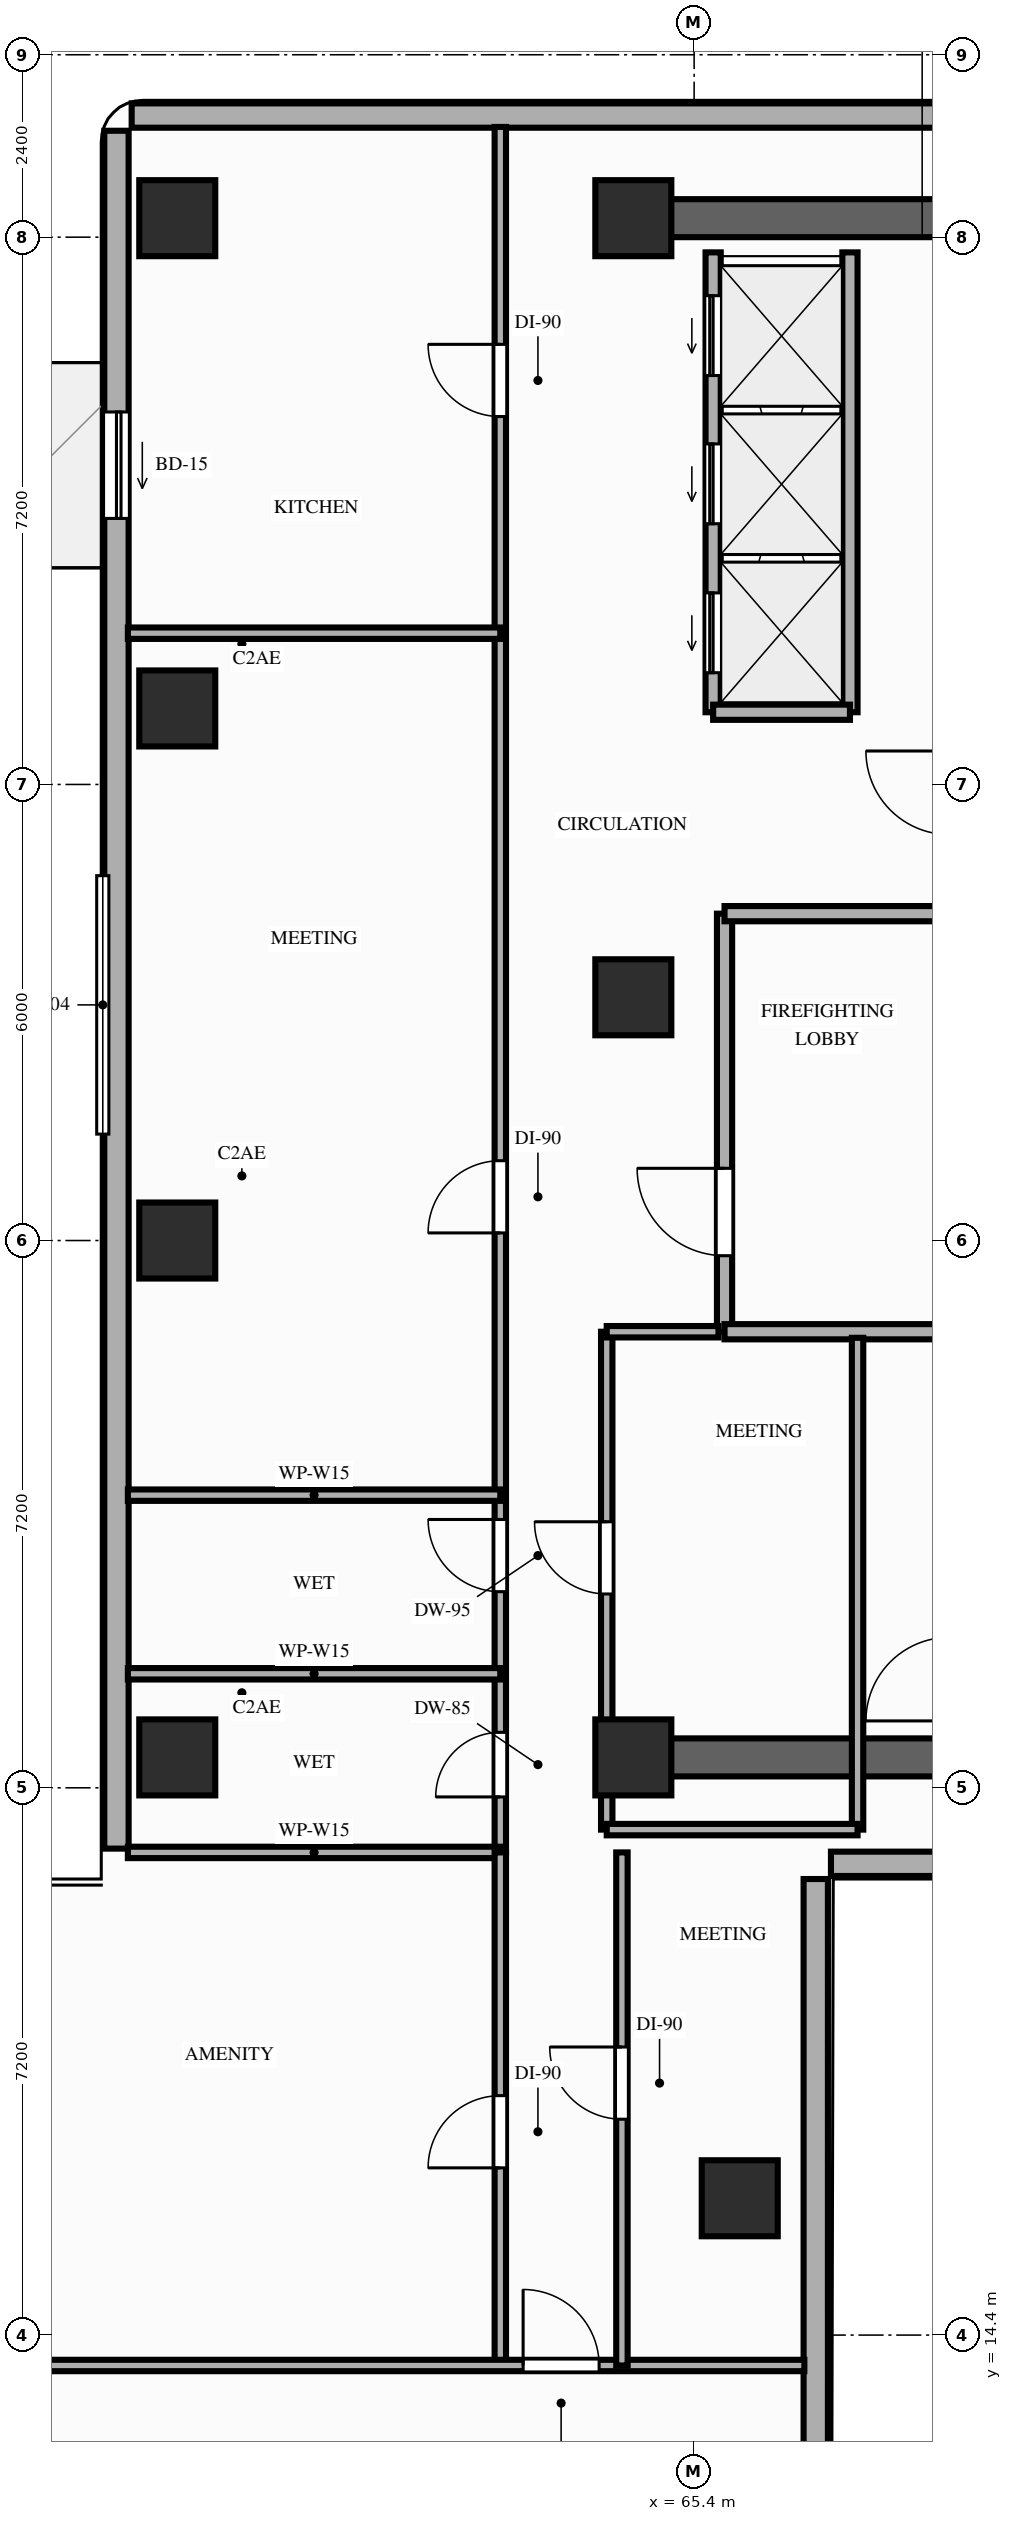
"""IFC4 building model, lengths in metres.
Left out: names, types, materials, properties, quantities, classifications, styles, units other than length and angle.
Written with IfcOpenShell. Run it as: python <this file> out.ifc"""

import sys

from ifc_helpers import new_model, si_unit, direction, frame, frame_2d, origin, origin_2d, place, context, subcontext, project, spatial, rectangle, extrude, element, fill, save


model = new_model("IFC4")
c1 = context("Model", 3, precision=1e-05, world=origin(), true_north=direction((0.0, 1.0)))
c2 = subcontext(c1, "Body", "Model", "MODEL_VIEW")
j1 = project(units=[si_unit("LENGTHUNIT", "METRE"), si_unit("PLANEANGLEUNIT", "RADIAN")], contexts=[c1])
p1 = place(None, origin())
s1 = spatial("IfcSite", under=j1, at=p1, CompositionType="ELEMENT")
p2 = place(p1, origin())
s2 = spatial("IfcBuilding", under=s1, at=p2, CompositionType="ELEMENT")
p3 = place(p2, frame((0.0, 0.0, 50.0)))
s3 = spatial("IfcBuildingStorey", under=s2, at=p3, CompositionType="ELEMENT", Elevation=50.0)
for number, where, z_axis, x_axis in (
    (1, (64.6, 22.0, 0.0), (0.0, 0.0, 1.0), (1.0, 0.0, 0.0)),
    (2, (64.6, 32.0, 0.0), (0.0, 0.0, 1.0), (1.0, 0.0, 0.0)),
    (3, (64.6, 42.25, 0.0), (0.0, 0.0, 1.0), (1.0, 0.0, 0.0)),
    (4, (58.6, 22.0, 0.0), (0.0, 0.0, 1.0), (1.0, 0.0, 0.0)),
    (5, (58.6, 28.8, 0.0), (0.0, 0.0, 1.0), (1.0, 0.0, 0.0)),
    (6, (58.6, 35.8, 0.0), (0.0, 0.0, 1.0), (1.0, 0.0, 0.0)),
    (7, (58.6, 42.25, 0.0), (0.0, 0.0, 1.0), (1.0, 0.0, 0.0)),
    (8, (66.0, 16.2, 0.0), (0.0, 0.0, 1.0), (1.0, 0.0, 0.0)),
):
    element("IfcColumn", number, at=place(p3, frame(where, z_axis=z_axis, x_axis=x_axis)), inside=s3, PredefinedType="COLUMN", context=c2, shape_type="SweptSolid", body=[
        extrude(rectangle(XDim=1.0, YDim=1.0, at=origin_2d()), origin(), (0.0, 0.0, 1.0), 3.2),
    ])
p4 = place(p3, frame((57.8, 43.4, 0.0), z_axis=(0.0, 0.0, 1.0), x_axis=(0.0, -1.0, 0.0)))
e9 = element("IfcWall", 9, at=p4, inside=s3, PredefinedType="STANDARD", context=c2, shape_type="SweptSolid", body=[
    extrude(rectangle(XDim=22.6, YDim=0.32, at=frame_2d((11.3, 0.0))), origin(), (0.0, 0.0, 1.0), 2.51),
])
p5 = place(p4, frame((3.7, 0.0, 0.0)))
e10 = element("IfcOpeningElement", 10, at=p5, cuts=e9, PredefinedType="OPENING", context=c2, shape_type="SweptSolid", body=[
    extrude(rectangle(XDim=1.4, YDim=2.1, at=frame_2d((0.7, 1.05))), frame((0.0, 0.17, 0.0), z_axis=(0.0, -1.0, 0.0), x_axis=(1.0, 0.0, 0.0)), (0.0, 0.0, 1.0), 0.34),
])
p6 = place(p3, frame((72.8, 43.6, 0.0), z_axis=(0.0, 0.0, 1.0), x_axis=(-1.0, 0.0, 0.0)))
e11 = element("IfcWall", 11, at=p6, inside=s3, PredefinedType="STANDARD", context=c2, shape_type="SweptSolid", body=[
    extrude(rectangle(XDim=14.8, YDim=0.32, at=frame_2d((7.4, 0.0))), origin(), (0.0, 0.0, 1.0), 3.02),
])
p7 = place(p3, frame((67.0, 7.6, 0.0), z_axis=(0.0, 0.0, 1.0), x_axis=(0.0, 1.0, 0.0)))
e12 = element("IfcWall", 12, at=p7, inside=s3, PredefinedType="STANDARD", context=c2, shape_type="SweptSolid", body=[
    extrude(rectangle(XDim=12.8, YDim=0.32, at=frame_2d((6.4, 0.0))), origin(), (0.0, 0.0, 1.0), 3.02),
])
p8 = place(p3, frame((67.2, 20.6, 0.0), z_axis=(0.0, 0.0, 1.0), x_axis=(1.0, 0.0, 0.0)))
e13 = element("IfcWall", 13, at=p8, inside=s3, PredefinedType="STANDARD", context=c2, shape_type="SweptSolid", body=[
    extrude(rectangle(XDim=5.6, YDim=0.32, at=frame_2d((2.8, 0.0))), origin(), (0.0, 0.0, 1.0), 3.02),
])
for number, where, z_axis, x_axis in (
    (14, (64.6, 42.25, 0.0), (0.0, 0.0, 1.0), (1.0, 0.0, 0.0)),
    (15, (64.6, 22.0, 0.0), (0.0, 0.0, 1.0), (1.0, 0.0, 0.0)),
):
    element("IfcWall", number, at=place(p3, frame(where, z_axis=z_axis, x_axis=x_axis)), inside=s3, PredefinedType="SHEAR", context=c2, shape_type="SweptSolid", body=[
        extrude(rectangle(XDim=7.5, YDim=0.5, at=frame_2d((3.75, 0.0))), origin(), (0.0, 0.0, 1.0), 3.02),
    ])
p9 = place(p3, frame((65.65, 35.75, 0.0), z_axis=(0.0, 0.0, 1.0), x_axis=(0.0, 1.0, 0.0)))
e16 = element("IfcWall", 16, at=p9, inside=s3, PredefinedType="MOVABLE", context=c2, shape_type="SweptSolid", body=[
    extrude(rectangle(XDim=6.05, YDim=0.2, at=frame_2d((3.025, 0.0))), origin(), (0.0, 0.0, 1.0), 3.02),
])
p10 = place(p9, frame((0.52, 0.0, 0.0)))
e17 = element("IfcOpeningElement", 17, at=p10, cuts=e16, PredefinedType="OPENING", context=c2, shape_type="SweptSolid", body=[
    extrude(rectangle(XDim=1.05, YDim=2.15, at=frame_2d((0.525, 1.075))), frame((0.0, 0.11, 0.0), z_axis=(0.0, -1.0, 0.0), x_axis=(1.0, 0.0, 0.0)), (0.0, 0.0, 1.0), 0.22),
])
p11 = place(p9, frame((2.48, 0.0, 0.0)))
e18 = element("IfcOpeningElement", 18, at=p11, cuts=e16, PredefinedType="OPENING", context=c2, shape_type="SweptSolid", body=[
    extrude(rectangle(XDim=1.05, YDim=2.15, at=frame_2d((0.525, 1.075))), frame((0.0, 0.11, 0.0), z_axis=(0.0, -1.0, 0.0), x_axis=(1.0, 0.0, 0.0)), (0.0, 0.0, 1.0), 0.22),
])
p12 = place(p9, frame((4.43, 0.0, 0.0)))
e19 = element("IfcOpeningElement", 19, at=p12, cuts=e16, PredefinedType="OPENING", context=c2, shape_type="SweptSolid", body=[
    extrude(rectangle(XDim=1.05, YDim=2.15, at=frame_2d((0.525, 1.075))), frame((0.0, 0.11, 0.0), z_axis=(0.0, -1.0, 0.0), x_axis=(1.0, 0.0, 0.0)), (0.0, 0.0, 1.0), 0.22),
])
p13 = place(p3, frame((67.45, 35.75, 0.0), z_axis=(0.0, 0.0, 1.0), x_axis=(0.0, 1.0, 0.0)))
e20 = element("IfcWall", 20, at=p13, inside=s3, PredefinedType="MOVABLE", context=c2, shape_type="SweptSolid", body=[
    extrude(rectangle(XDim=6.05, YDim=0.2, at=frame_2d((3.025, 0.0))), origin(), (0.0, 0.0, 1.0), 3.02),
])
p14 = place(p3, frame((65.65, 35.75, 0.0), z_axis=(0.0, 0.0, 1.0), x_axis=(1.0, 0.0, 0.0)))
e21 = element("IfcWall", 21, at=p14, inside=s3, PredefinedType="MOVABLE", context=c2, shape_type="SweptSolid", body=[
    extrude(rectangle(XDim=1.8, YDim=0.2, at=frame_2d((0.9, 0.0))), origin(), (0.0, 0.0, 1.0), 3.02),
])
p15 = place(p3, frame((65.8, 27.6, 0.0), z_axis=(0.0, 0.0, 1.0), x_axis=(0.0, 1.0, 0.0)))
e22 = element("IfcWall", 22, at=p15, inside=s3, PredefinedType="PARTITIONING", context=c2, shape_type="SweptSolid", body=[
    extrude(rectangle(XDim=5.5, YDim=0.2, at=frame_2d((2.75, 0.0))), origin(), (0.0, 0.0, 1.0), 3.02),
])
p16 = place(p15, frame((1.0, 0.0, 0.0)))
e23 = element("IfcOpeningElement", 23, at=p16, cuts=e22, PredefinedType="OPENING", context=c2, shape_type="SweptSolid", body=[
    extrude(rectangle(XDim=1.15, YDim=2.15, at=frame_2d((0.575, 1.075))), frame((0.0, 0.11, 0.0), z_axis=(0.0, -1.0, 0.0), x_axis=(1.0, 0.0, 0.0)), (0.0, 0.0, 1.0), 0.22),
])
p17 = place(p3, frame((65.8, 33.1, 0.0), z_axis=(0.0, 0.0, 1.0), x_axis=(1.0, 0.0, 0.0)))
e24 = element("IfcWall", 24, at=p17, inside=s3, PredefinedType="PARTITIONING", context=c2, shape_type="SweptSolid", body=[
    extrude(rectangle(XDim=3.6, YDim=0.2, at=frame_2d((1.8, 0.0))), origin(), (0.0, 0.0, 1.0), 3.02),
])
p18 = place(p3, frame((65.8, 27.6, 0.0), z_axis=(0.0, 0.0, 1.0), x_axis=(1.0, 0.0, 0.0)))
e25 = element("IfcWall", 25, at=p18, inside=s3, PredefinedType="PARTITIONING", context=c2, shape_type="SweptSolid", body=[
    extrude(rectangle(XDim=3.4, YDim=0.2, at=frame_2d((1.7, 0.0))), origin(), (0.0, 0.0, 1.0), 3.02),
])
p19 = place(p3, frame((64.25, 21.05, 0.0), z_axis=(0.0, 0.0, 1.0), x_axis=(0.0, 1.0, 0.0)))
e26 = element("IfcWall", 26, at=p19, inside=s3, PredefinedType="PARTITIONING", context=c2, shape_type="SweptSolid", body=[
    extrude(rectangle(XDim=6.55, YDim=0.15, at=frame_2d((3.275, 0.0))), origin(), (0.0, 0.0, 1.0), 2.51),
])
p20 = place(p19, frame((3.1, 0.0, 0.0)))
e27 = element("IfcOpeningElement", 27, at=p20, cuts=e26, PredefinedType="OPENING", context=c2, shape_type="SweptSolid", body=[
    extrude(rectangle(XDim=0.95, YDim=2.15, at=frame_2d((0.475, 1.075))), frame((0.0, 0.085, 0.0), z_axis=(0.0, -1.0, 0.0), x_axis=(1.0, 0.0, 0.0)), (0.0, 0.0, 1.0), 0.17),
])
p21 = place(p3, frame((67.55, 21.05, 0.0), z_axis=(0.0, 0.0, 1.0), x_axis=(0.0, 1.0, 0.0)))
e28 = element("IfcWall", 28, at=p21, inside=s3, PredefinedType="PARTITIONING", context=c2, shape_type="SweptSolid", body=[
    extrude(rectangle(XDim=6.47, YDim=0.15, at=frame_2d((3.235, 0.0))), origin(), (0.0, 0.0, 1.0), 2.51),
])
p22 = place(p3, frame((64.25, 21.05, 0.0), z_axis=(0.0, 0.0, 1.0), x_axis=(1.0, 0.0, 0.0)))
e29 = element("IfcWall", 29, at=p22, inside=s3, PredefinedType="PARTITIONING", context=c2, shape_type="SweptSolid", body=[
    extrude(rectangle(XDim=3.3, YDim=0.15, at=frame_2d((1.65, 0.0))), origin(), (0.0, 0.0, 1.0), 2.51),
])
p23 = place(p3, frame((64.25, 27.6, 0.0), z_axis=(0.0, 0.0, 1.0), x_axis=(1.0, 0.0, 0.0)))
e30 = element("IfcWall", 30, at=p23, inside=s3, PredefinedType="PARTITIONING", context=c2, shape_type="SweptSolid", body=[
    extrude(rectangle(XDim=1.47, YDim=0.15, at=frame_2d((0.735, 0.0))), origin(), (0.0, 0.0, 1.0), 2.51),
])
p24 = place(p3, frame((62.85, 20.75, 0.0), z_axis=(0.0, 0.0, 1.0), x_axis=(0.0, 1.0, 0.0)))
e31 = element("IfcWall", 31, at=p24, inside=s3, PredefinedType="PARTITIONING", context=c2, shape_type="SweptSolid", body=[
    extrude(rectangle(XDim=22.7, YDim=0.15, at=frame_2d((11.35, 0.0))), origin(), (0.0, 0.0, 1.0), 2.51),
])
p25 = place(p24, frame((0.73, 0.0, 0.0)))
e32 = element("IfcOpeningElement", 32, at=p25, cuts=e31, PredefinedType="OPENING", context=c2, shape_type="SweptSolid", body=[
    extrude(rectangle(XDim=0.85, YDim=2.1, at=frame_2d((0.425, 1.05))), frame((0.0, 0.085, 0.0), z_axis=(0.0, -1.0, 0.0), x_axis=(1.0, 0.0, 0.0)), (0.0, 0.0, 1.0), 0.17),
])
p26 = place(p24, frame((3.43, 0.0, 0.0)))
e33 = element("IfcOpeningElement", 33, at=p26, cuts=e31, PredefinedType="OPENING", context=c2, shape_type="SweptSolid", body=[
    extrude(rectangle(XDim=0.95, YDim=2.1, at=frame_2d((0.475, 1.05))), frame((0.0, 0.085, 0.0), z_axis=(0.0, -1.0, 0.0), x_axis=(1.0, 0.0, 0.0)), (0.0, 0.0, 1.0), 0.17),
])
p27 = place(p24, frame((8.15, 0.0, 0.0)))
e34 = element("IfcOpeningElement", 34, at=p27, cuts=e31, PredefinedType="OPENING", context=c2, shape_type="SweptSolid", body=[
    extrude(rectangle(XDim=0.95, YDim=2.15, at=frame_2d((0.475, 1.075))), frame((0.0, 0.085, 0.0), z_axis=(0.0, -1.0, 0.0), x_axis=(1.0, 0.0, 0.0)), (0.0, 0.0, 1.0), 0.17),
])
p28 = place(p24, frame((18.89, 0.0, 0.0)))
e35 = element("IfcOpeningElement", 35, at=p28, cuts=e31, PredefinedType="OPENING", context=c2, shape_type="SweptSolid", body=[
    extrude(rectangle(XDim=0.95, YDim=2.15, at=frame_2d((0.475, 1.075))), frame((0.0, 0.085, 0.0), z_axis=(0.0, -1.0, 0.0), x_axis=(1.0, 0.0, 0.0)), (0.0, 0.0, 1.0), 0.17),
])
for number, where, z_axis, x_axis in (
    (36, (57.95, 20.75, 0.0), (0.0, 0.0, 1.0), (1.0, 0.0, 0.0)),
    (37, (57.95, 23.1, 0.0), (0.0, 0.0, 1.0), (1.0, 0.0, 0.0)),
    (38, (57.95, 25.45, 0.0), (0.0, 0.0, 1.0), (1.0, 0.0, 0.0)),
    (39, (57.95, 36.79, 0.0), (0.0, 0.0, 1.0), (1.0, 0.0, 0.0)),
):
    element("IfcWall", number, at=place(p3, frame(where, z_axis=z_axis, x_axis=x_axis)), inside=s3, PredefinedType="PARTITIONING", context=c2, shape_type="SweptSolid", body=[
        extrude(rectangle(XDim=4.9, YDim=0.15, at=frame_2d((2.45, 0.0))), origin(), (0.0, 0.0, 1.0), 2.51),
    ])
p29 = place(p3, frame((62.85, 14.0, 0.0), z_axis=(0.0, 0.0, 1.0), x_axis=(0.0, 1.0, 0.0)))
e40 = element("IfcWall", 40, at=p29, inside=s3, PredefinedType="PARTITIONING", context=c2, shape_type="SweptSolid", body=[
    extrude(rectangle(XDim=6.75, YDim=0.15, at=frame_2d((3.375, 0.0))), origin(), (0.0, 0.0, 1.0), 2.51),
])
p30 = place(p29, frame((2.6, 0.0, 0.0)))
e41 = element("IfcOpeningElement", 41, at=p30, cuts=e40, PredefinedType="OPENING", context=c2, shape_type="SweptSolid", body=[
    extrude(rectangle(XDim=0.95, YDim=2.15, at=frame_2d((0.475, 1.075))), frame((0.0, 0.085, 0.0), z_axis=(0.0, -1.0, 0.0), x_axis=(1.0, 0.0, 0.0)), (0.0, 0.0, 1.0), 0.17),
])
p31 = place(p3, frame((55.55, 14.0, 0.0), z_axis=(0.0, 0.0, 1.0), x_axis=(1.0, 0.0, 0.0)))
e42 = element("IfcWall", 42, at=p31, inside=s3, PredefinedType="PARTITIONING", context=c2, shape_type="SweptSolid", body=[
    extrude(rectangle(XDim=11.3, YDim=0.15, at=frame_2d((5.65, 0.0))), origin(), (0.0, 0.0, 1.0), 2.51),
])
p32 = place(p31, frame((7.6, 0.0, 0.0)))
e43 = element("IfcOpeningElement", 43, at=p32, cuts=e42, PredefinedType="OPENING", context=c2, shape_type="SweptSolid", body=[
    extrude(rectangle(XDim=1.0, YDim=2.15, at=frame_2d((0.5, 1.075))), frame((0.0, 0.085, 0.0), z_axis=(0.0, -1.0, 0.0), x_axis=(1.0, 0.0, 0.0)), (0.0, 0.0, 1.0), 0.17),
])
p33 = place(p3, frame((64.45, 14.0, 0.0), z_axis=(0.0, 0.0, 1.0), x_axis=(0.0, 1.0, 0.0)))
e44 = element("IfcWall", 44, at=p33, inside=s3, PredefinedType="PARTITIONING", context=c2, shape_type="SweptSolid", body=[
    extrude(rectangle(XDim=6.75, YDim=0.15, at=frame_2d((3.375, 0.0))), origin(), (0.0, 0.0, 1.0), 2.51),
])
p34 = place(p33, frame((3.24, 0.0, 0.0)))
e45 = element("IfcOpeningElement", 45, at=p34, cuts=e44, PredefinedType="OPENING", context=c2, shape_type="SweptSolid", body=[
    extrude(rectangle(XDim=0.95, YDim=2.15, at=frame_2d((0.475, 1.075))), frame((0.0, 0.085, 0.0), z_axis=(0.0, -1.0, 0.0), x_axis=(1.0, 0.0, 0.0)), (0.0, 0.0, 1.0), 0.17),
])
p35 = place(p5, origin())
e46 = element("IfcDoor", 46, at=p35, inside=s3, OperationType="SLIDING_TO_RIGHT", PredefinedType="DOOR", context=c2, shape_type="SweptSolid", body=[
    extrude(rectangle(XDim=1.4, YDim=2.1, at=frame_2d((0.7, 1.05))), frame((0.0, 0.025, 0.0), z_axis=(0.0, -1.0, 0.0), x_axis=(1.0, 0.0, 0.0)), (0.0, 0.0, 1.0), 0.05),
])
fill(e10, e46)
p36 = place(p10, origin())
e47 = element("IfcDoor", 47, at=p36, inside=s3, OperationType="SLIDING_TO_LEFT", PredefinedType="DOOR", context=c2, shape_type="SweptSolid", body=[
    extrude(rectangle(XDim=1.05, YDim=2.15, at=frame_2d((0.525, 1.075))), frame((0.0, 0.025, 0.0), z_axis=(0.0, -1.0, 0.0), x_axis=(1.0, 0.0, 0.0)), (0.0, 0.0, 1.0), 0.05),
])
fill(e17, e47)
p37 = place(p11, origin())
e48 = element("IfcDoor", 48, at=p37, inside=s3, OperationType="SLIDING_TO_LEFT", PredefinedType="DOOR", context=c2, shape_type="SweptSolid", body=[
    extrude(rectangle(XDim=1.05, YDim=2.15, at=frame_2d((0.525, 1.075))), frame((0.0, 0.025, 0.0), z_axis=(0.0, -1.0, 0.0), x_axis=(1.0, 0.0, 0.0)), (0.0, 0.0, 1.0), 0.05),
])
fill(e18, e48)
p38 = place(p12, origin())
e49 = element("IfcDoor", 49, at=p38, inside=s3, OperationType="SLIDING_TO_LEFT", PredefinedType="DOOR", context=c2, shape_type="SweptSolid", body=[
    extrude(rectangle(XDim=1.05, YDim=2.15, at=frame_2d((0.525, 1.075))), frame((0.0, 0.025, 0.0), z_axis=(0.0, -1.0, 0.0), x_axis=(1.0, 0.0, 0.0)), (0.0, 0.0, 1.0), 0.05),
])
fill(e19, e49)
p39 = place(p16, origin())
e50 = element("IfcDoor", 50, at=p39, inside=s3, OperationType="SINGLE_SWING_RIGHT", PredefinedType="DOOR", context=c2, shape_type="SweptSolid", body=[
    extrude(rectangle(XDim=1.15, YDim=2.15, at=frame_2d((0.575, 1.075))), frame((0.0, 0.025, 0.0), z_axis=(0.0, -1.0, 0.0), x_axis=(1.0, 0.0, 0.0)), (0.0, 0.0, 1.0), 0.05),
])
fill(e23, e50)
p40 = place(p20, origin())
e51 = element("IfcDoor", 51, at=p40, inside=s3, OperationType="SINGLE_SWING_RIGHT", PredefinedType="DOOR", context=c2, shape_type="SweptSolid", body=[
    extrude(rectangle(XDim=0.95, YDim=2.15, at=frame_2d((0.475, 1.075))), frame((0.0, 0.025, 0.0), z_axis=(0.0, -1.0, 0.0), x_axis=(1.0, 0.0, 0.0)), (0.0, 0.0, 1.0), 0.05),
])
fill(e27, e51)
p41 = place(p25, origin())
e52 = element("IfcDoor", 52, at=p41, inside=s3, OperationType="SINGLE_SWING_LEFT", PredefinedType="DOOR", context=c2, shape_type="SweptSolid", body=[
    extrude(rectangle(XDim=0.85, YDim=2.1, at=frame_2d((0.425, 1.05))), frame((0.0, 0.025, 0.0), z_axis=(0.0, -1.0, 0.0), x_axis=(1.0, 0.0, 0.0)), (0.0, 0.0, 1.0), 0.05),
])
fill(e32, e52)
p42 = place(p26, origin())
e53 = element("IfcDoor", 53, at=p42, inside=s3, OperationType="SINGLE_SWING_RIGHT", PredefinedType="DOOR", context=c2, shape_type="SweptSolid", body=[
    extrude(rectangle(XDim=0.95, YDim=2.1, at=frame_2d((0.475, 1.05))), frame((0.0, 0.025, 0.0), z_axis=(0.0, -1.0, 0.0), x_axis=(1.0, 0.0, 0.0)), (0.0, 0.0, 1.0), 0.05),
])
fill(e33, e53)
p43 = place(p27, origin())
e54 = element("IfcDoor", 54, at=p43, inside=s3, OperationType="SINGLE_SWING_LEFT", PredefinedType="DOOR", context=c2, shape_type="SweptSolid", body=[
    extrude(rectangle(XDim=0.95, YDim=2.15, at=frame_2d((0.475, 1.075))), frame((0.0, 0.025, 0.0), z_axis=(0.0, -1.0, 0.0), x_axis=(1.0, 0.0, 0.0)), (0.0, 0.0, 1.0), 0.05),
])
fill(e34, e54)
p44 = place(p28, origin())
e55 = element("IfcDoor", 55, at=p44, inside=s3, OperationType="SINGLE_SWING_RIGHT", PredefinedType="DOOR", context=c2, shape_type="SweptSolid", body=[
    extrude(rectangle(XDim=0.95, YDim=2.15, at=frame_2d((0.475, 1.075))), frame((0.0, 0.025, 0.0), z_axis=(0.0, -1.0, 0.0), x_axis=(1.0, 0.0, 0.0)), (0.0, 0.0, 1.0), 0.05),
])
fill(e35, e55)
p45 = place(p30, origin())
e56 = element("IfcDoor", 56, at=p45, inside=s3, OperationType="SINGLE_SWING_LEFT", PredefinedType="DOOR", context=c2, shape_type="SweptSolid", body=[
    extrude(rectangle(XDim=0.95, YDim=2.15, at=frame_2d((0.475, 1.075))), frame((0.0, 0.025, 0.0), z_axis=(0.0, -1.0, 0.0), x_axis=(1.0, 0.0, 0.0)), (0.0, 0.0, 1.0), 0.05),
])
fill(e41, e56)
p46 = place(p34, origin())
e57 = element("IfcDoor", 57, at=p46, inside=s3, OperationType="SINGLE_SWING_RIGHT", PredefinedType="DOOR", context=c2, shape_type="SweptSolid", body=[
    extrude(rectangle(XDim=0.95, YDim=2.15, at=frame_2d((0.475, 1.075))), frame((0.0, 0.025, 0.0), z_axis=(0.0, -1.0, 0.0), x_axis=(1.0, 0.0, 0.0)), (0.0, 0.0, 1.0), 0.05),
])
fill(e45, e57)
p47 = place(p32, origin())
e58 = element("IfcDoor", 58, at=p47, inside=s3, OperationType="SINGLE_SWING_LEFT", PredefinedType="DOOR", context=c2, shape_type="SweptSolid", body=[
    extrude(rectangle(XDim=1.0, YDim=2.15, at=frame_2d((0.5, 1.075))), frame((0.0, 0.025, 0.0), z_axis=(0.0, -1.0, 0.0), x_axis=(1.0, 0.0, 0.0)), (0.0, 0.0, 1.0), 0.05),
])
fill(e43, e58)
save(model, sys.argv[1])
